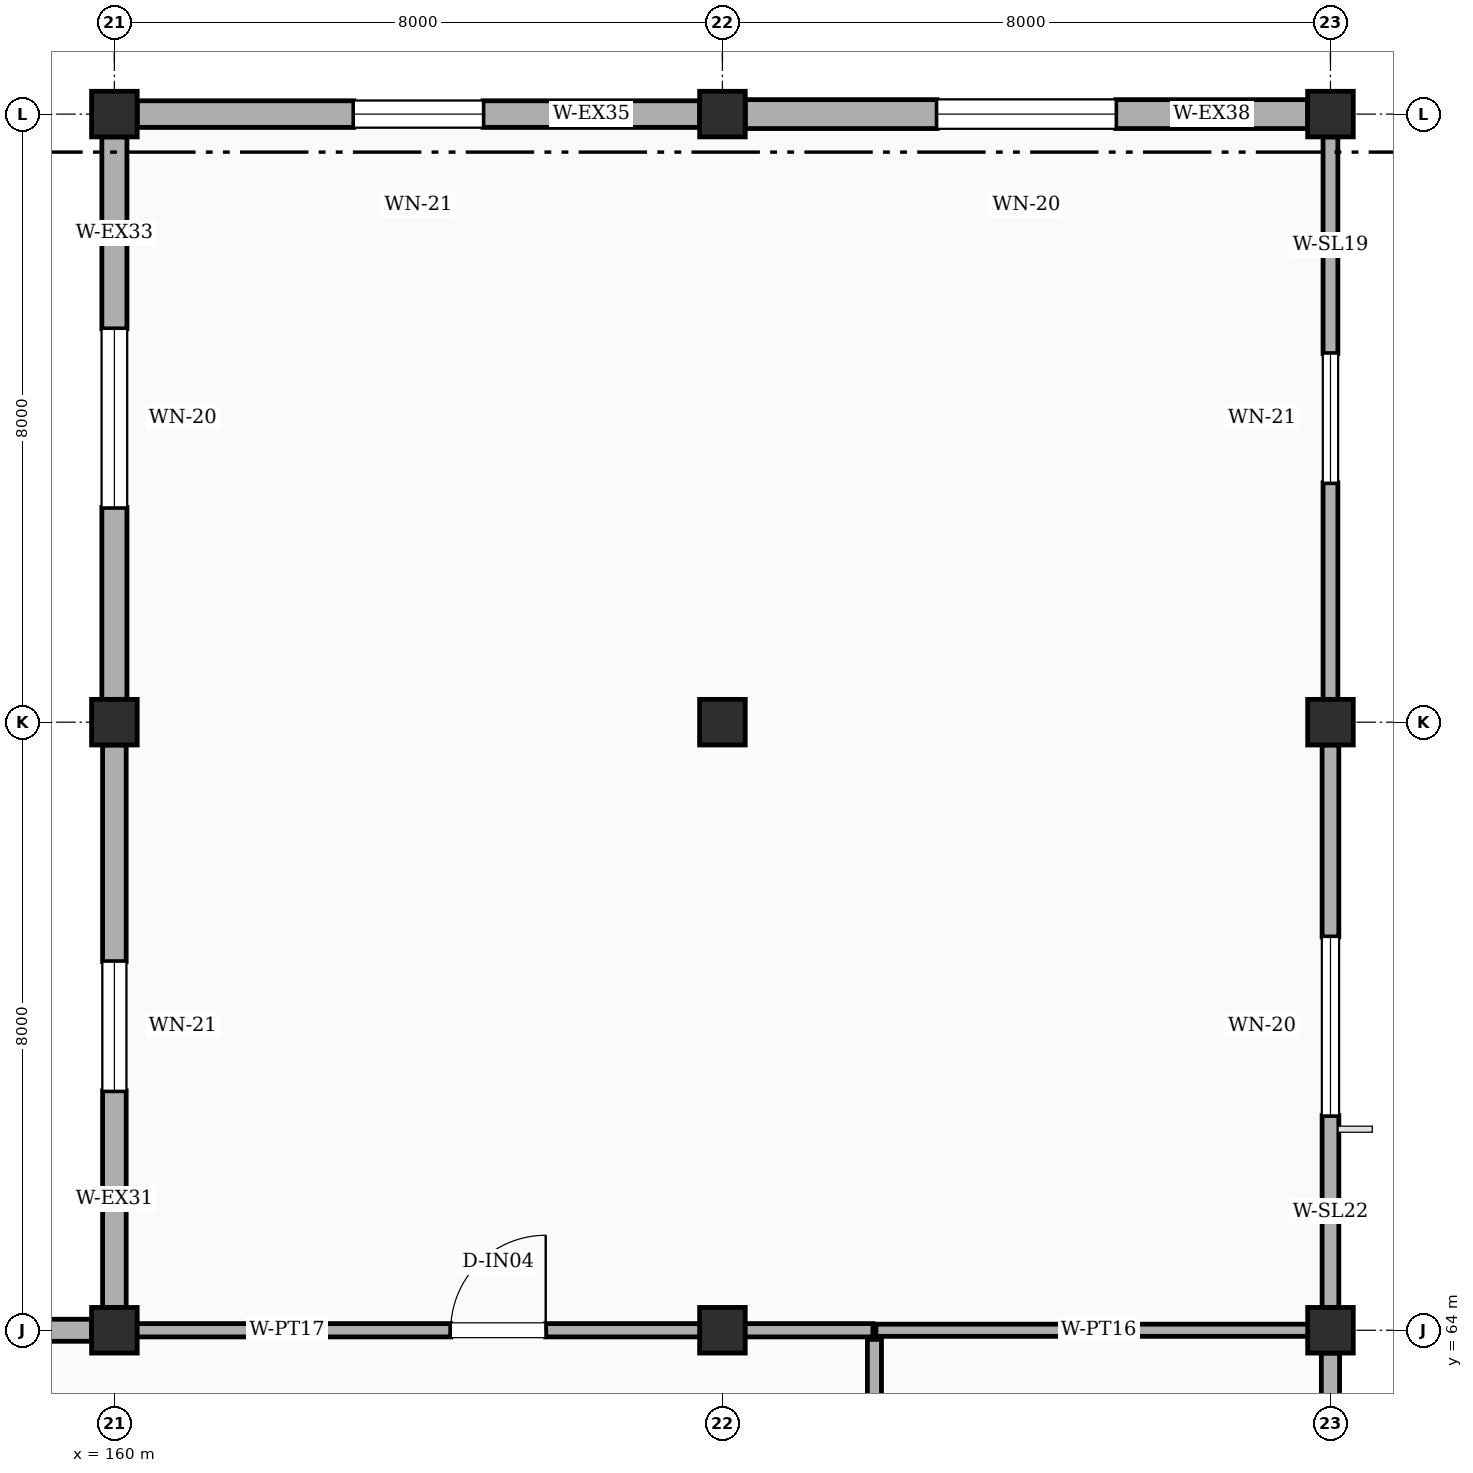
"""IFC4 building model, lengths in metres.
Left out: names, types, materials, properties, quantities, classifications, styles, units other than length and angle.
Written with IfcOpenShell. Run it as: python <this file> out.ifc"""

import sys

from ifc_helpers import new_model, si_unit, direction, frame, frame_2d, origin, origin_2d, place, context, subcontext, project, spatial, rectangle, extrude, element, fill, save


model = new_model("IFC4")
c1 = context("Model", 3, precision=1e-05, world=origin(), true_north=direction((0.0, 1.0)))
c2 = subcontext(c1, "Body", "Model", "MODEL_VIEW")
j1 = project(units=[si_unit("LENGTHUNIT", "METRE"), si_unit("PLANEANGLEUNIT", "RADIAN")], contexts=[c1])
p1 = place(None, origin())
s1 = spatial("IfcSite", under=j1, at=p1, CompositionType="ELEMENT")
p2 = place(p1, origin())
s2 = spatial("IfcBuilding", under=s1, at=p2, CompositionType="ELEMENT")
p3 = place(p2, frame((0.0, 0.0, 19.2)))
s3 = spatial("IfcBuildingStorey", under=s2, at=p3, CompositionType="ELEMENT", Elevation=19.2)
for number, where, z_axis, x_axis in (
    (1, (160.0, 64.0, 0.0), (0.0, 0.0, 1.0), (1.0, 0.0, 0.0)),
    (2, (168.0, 64.0, 0.0), (0.0, 0.0, 1.0), (1.0, 0.0, 0.0)),
    (3, (176.0, 64.0, 0.0), (0.0, 0.0, 1.0), (1.0, 0.0, 0.0)),
    (4, (160.0, 72.0, 0.0), (0.0, 0.0, 1.0), (1.0, 0.0, 0.0)),
    (5, (160.0, 80.0, 0.0), (0.0, 0.0, 1.0), (1.0, 0.0, 0.0)),
    (6, (168.0, 72.0, 0.0), (0.0, 0.0, 1.0), (1.0, 0.0, 0.0)),
    (7, (168.0, 80.0, 0.0), (0.0, 0.0, 1.0), (1.0, 0.0, 0.0)),
    (8, (176.0, 72.0, 0.0), (0.0, 0.0, 1.0), (1.0, 0.0, 0.0)),
    (9, (176.0, 80.0, 0.0), (0.0, 0.0, 1.0), (1.0, 0.0, 0.0)),
):
    element("IfcColumn", number, at=place(p3, frame(where, z_axis=z_axis, x_axis=x_axis)), inside=s3, PredefinedType="COLUMN", context=c2, shape_type="SweptSolid", body=[
        extrude(rectangle(XDim=0.6, YDim=0.6, at=origin_2d()), origin(), (0.0, 0.0, 1.0), 4.2),
    ])
p4 = place(p3, frame((176.0, 56.3, 0.0), z_axis=(0.0, 0.0, 1.0), x_axis=(0.0, 1.0, 0.0)))
e10 = element("IfcWall", 10, at=p4, inside=s3, PredefinedType="SOLIDWALL", context=c2, shape_type="SweptSolid", body=[
    extrude(rectangle(XDim=7.4, YDim=0.24, at=frame_2d((3.7, 0.0))), origin(), (0.0, 0.0, 1.0), 3.57),
])
p5 = place(p4, frame((2.85, 0.0, 0.95)))
e11 = element("IfcOpeningElement", 11, at=p5, cuts=e10, PredefinedType="OPENING", context=c2, shape_type="SweptSolid", body=[
    extrude(rectangle(XDim=1.7, YDim=1.65, at=frame_2d((0.85, 0.825))), frame((0.0, 0.13, 0.0), z_axis=(0.0, -1.0, 0.0), x_axis=(1.0, 0.0, 0.0)), (0.0, 0.0, 1.0), 0.26),
])
p6 = place(p3, frame((176.0, 64.3, 0.0), z_axis=(0.0, 0.0, 1.0), x_axis=(0.0, 1.0, 0.0)))
e12 = element("IfcWall", 12, at=p6, inside=s3, PredefinedType="SOLIDWALL", context=c2, shape_type="SweptSolid", body=[
    extrude(rectangle(XDim=7.4, YDim=0.22, at=frame_2d((3.7, 0.0))), origin(), (0.0, 0.0, 1.0), 3.57),
])
p7 = place(p6, frame((2.525, 0.0, 0.95)))
e13 = element("IfcOpeningElement", 13, at=p7, cuts=e12, PredefinedType="OPENING", context=c2, shape_type="SweptSolid", body=[
    extrude(rectangle(XDim=2.35, YDim=1.65, at=frame_2d((1.175, 0.825))), frame((0.0, 0.12, 0.0), z_axis=(0.0, -1.0, 0.0), x_axis=(1.0, 0.0, 0.0)), (0.0, 0.0, 1.0), 0.24),
])
p8 = place(p3, frame((176.0, 72.3, 0.0), z_axis=(0.0, 0.0, 1.0), x_axis=(0.0, 1.0, 0.0)))
e14 = element("IfcWall", 14, at=p8, inside=s3, PredefinedType="SOLIDWALL", context=c2, shape_type="SweptSolid", body=[
    extrude(rectangle(XDim=7.4, YDim=0.195, at=frame_2d((3.7, 0.0))), origin(), (0.0, 0.0, 1.0), 3.58),
])
p9 = place(p8, frame((2.85, 0.0, 0.95)))
e15 = element("IfcOpeningElement", 15, at=p9, cuts=e14, PredefinedType="OPENING", context=c2, shape_type="SweptSolid", body=[
    extrude(rectangle(XDim=1.7, YDim=1.65, at=frame_2d((0.85, 0.825))), frame((0.0, 0.107, 0.0), z_axis=(0.0, -1.0, 0.0), x_axis=(1.0, 0.0, 0.0)), (0.0, 0.0, 1.0), 0.215),
])
p10 = place(p3, frame((175.7, 80.0, 0.0), z_axis=(0.0, 0.0, 1.0), x_axis=(-1.0, 0.0, 0.0)))
e16 = element("IfcWall", 16, at=p10, inside=s3, PredefinedType="STANDARD", context=c2, shape_type="SweptSolid", body=[
    extrude(rectangle(XDim=7.4, YDim=0.38, at=frame_2d((3.7, 0.0))), origin(), (0.0, 0.0, 1.0), 3.58),
])
p11 = place(p10, frame((2.525, 0.0, 0.95)))
e17 = element("IfcOpeningElement", 17, at=p11, cuts=e16, PredefinedType="OPENING", context=c2, shape_type="SweptSolid", body=[
    extrude(rectangle(XDim=2.35, YDim=1.65, at=frame_2d((1.175, 0.825))), frame((0.0, 0.2, 0.0), z_axis=(0.0, -1.0, 0.0), x_axis=(1.0, 0.0, 0.0)), (0.0, 0.0, 1.0), 0.4),
])
p12 = place(p3, frame((167.7, 80.0, 0.0), z_axis=(0.0, 0.0, 1.0), x_axis=(-1.0, 0.0, 0.0)))
e18 = element("IfcWall", 18, at=p12, inside=s3, PredefinedType="STANDARD", context=c2, shape_type="SweptSolid", body=[
    extrude(rectangle(XDim=7.4, YDim=0.35, at=frame_2d((3.7, 0.0))), origin(), (0.0, 0.0, 1.0), 3.58),
])
p13 = place(p12, frame((2.85, 0.0, 0.95)))
e19 = element("IfcOpeningElement", 19, at=p13, cuts=e18, PredefinedType="OPENING", context=c2, shape_type="SweptSolid", body=[
    extrude(rectangle(XDim=1.7, YDim=1.65, at=frame_2d((0.85, 0.825))), frame((0.0, 0.185, 0.0), z_axis=(0.0, -1.0, 0.0), x_axis=(1.0, 0.0, 0.0)), (0.0, 0.0, 1.0), 0.37),
])
p14 = place(p3, frame((160.0, 79.7, 0.0), z_axis=(0.0, 0.0, 1.0), x_axis=(0.0, -1.0, 0.0)))
e20 = element("IfcWall", 20, at=p14, inside=s3, PredefinedType="STANDARD", context=c2, shape_type="SweptSolid", body=[
    extrude(rectangle(XDim=7.4, YDim=0.33, at=frame_2d((3.7, 0.0))), origin(), (0.0, 0.0, 1.0), 3.58),
])
p15 = place(p14, frame((2.525, 0.0, 0.95)))
e21 = element("IfcOpeningElement", 21, at=p15, cuts=e20, PredefinedType="OPENING", context=c2, shape_type="SweptSolid", body=[
    extrude(rectangle(XDim=2.35, YDim=1.65, at=frame_2d((1.175, 0.825))), frame((0.0, 0.175, 0.0), z_axis=(0.0, -1.0, 0.0), x_axis=(1.0, 0.0, 0.0)), (0.0, 0.0, 1.0), 0.35),
])
p16 = place(p3, frame((160.0, 71.7, 0.0), z_axis=(0.0, 0.0, 1.0), x_axis=(0.0, -1.0, 0.0)))
e22 = element("IfcWall", 22, at=p16, inside=s3, PredefinedType="STANDARD", context=c2, shape_type="SweptSolid", body=[
    extrude(rectangle(XDim=7.4, YDim=0.31, at=frame_2d((3.7, 0.0))), origin(), (0.0, 0.0, 1.0), 3.57),
])
p17 = place(p16, frame((2.85, 0.0, 0.95)))
e23 = element("IfcOpeningElement", 23, at=p17, cuts=e22, PredefinedType="OPENING", context=c2, shape_type="SweptSolid", body=[
    extrude(rectangle(XDim=1.7, YDim=1.65, at=frame_2d((0.85, 0.825))), frame((0.0, 0.165, 0.0), z_axis=(0.0, -1.0, 0.0), x_axis=(1.0, 0.0, 0.0)), (0.0, 0.0, 1.0), 0.33),
])
p18 = place(p3, frame((159.7, 64.0, 0.0), z_axis=(0.0, 0.0, 1.0), x_axis=(-1.0, 0.0, 0.0)))
e24 = element("IfcWall", 24, at=p18, inside=s3, PredefinedType="STANDARD", context=c2, shape_type="SweptSolid", body=[
    extrude(rectangle(XDim=7.4, YDim=0.29, at=frame_2d((3.7, 0.0))), origin(), (0.0, 0.0, 1.0), 3.57),
])
p19 = place(p18, frame((2.525, 0.0, 0.95)))
e25 = element("IfcOpeningElement", 25, at=p19, cuts=e24, PredefinedType="OPENING", context=c2, shape_type="SweptSolid", body=[
    extrude(rectangle(XDim=2.35, YDim=1.65, at=frame_2d((1.175, 0.825))), frame((0.0, 0.155, 0.0), z_axis=(0.0, -1.0, 0.0), x_axis=(1.0, 0.0, 0.0)), (0.0, 0.0, 1.0), 0.31),
])
p20 = place(p3, frame((170.0, 59.02, 0.0), z_axis=(0.0, 0.0, 1.0), x_axis=(0.0, 1.0, 0.0)))
e26 = element("IfcWall", 26, at=p20, inside=s3, PredefinedType="PLUMBINGWALL", context=c2, shape_type="SweptSolid", body=[
    extrude(rectangle(XDim=4.86, YDim=0.185, at=frame_2d((2.43, 0.0))), origin(), (0.0, 0.0, 1.0), 3.37),
])
p21 = place(p20, frame((1.95, 0.0, 0.0)))
e27 = element("IfcOpeningElement", 27, at=p21, cuts=e26, PredefinedType="OPENING", context=c2, shape_type="SweptSolid", body=[
    extrude(rectangle(XDim=0.96, YDim=2.1, at=frame_2d((0.48, 1.05))), frame((0.0, 0.103, 0.0), z_axis=(0.0, -1.0, 0.0), x_axis=(1.0, 0.0, 0.0)), (0.0, 0.0, 1.0), 0.205),
])
p22 = place(p3, frame((160.12, 64.0, 0.0), z_axis=(0.0, 0.0, 1.0), x_axis=(1.0, 0.0, 0.0)))
e28 = element("IfcWall", 28, at=p22, inside=s3, PredefinedType="PARTITIONING", context=c2, shape_type="SweptSolid", body=[
    extrude(rectangle(XDim=9.86, YDim=0.175, at=frame_2d((4.93, 0.0))), origin(), (0.0, 0.0, 1.0), 3.37),
])
p23 = place(p22, frame((4.305, 0.0, 0.0)))
e29 = element("IfcOpeningElement", 29, at=p23, cuts=e28, PredefinedType="OPENING", context=c2, shape_type="SweptSolid", body=[
    extrude(rectangle(XDim=1.25, YDim=2.15, at=frame_2d((0.625, 1.075))), frame((0.0, 0.097, 0.0), z_axis=(0.0, -1.0, 0.0), x_axis=(1.0, 0.0, 0.0)), (0.0, 0.0, 1.0), 0.195),
])
p24 = place(p3, frame((170.02, 64.0, 0.0), z_axis=(0.0, 0.0, 1.0), x_axis=(1.0, 0.0, 0.0)))
e30 = element("IfcWall", 30, at=p24, inside=s3, PredefinedType="PARTITIONING", context=c2, shape_type="SweptSolid", body=[
    extrude(rectangle(XDim=5.86, YDim=0.16, at=frame_2d((2.93, 0.0))), origin(), (0.0, 0.0, 1.0), 3.37),
])
p25 = place(p7, origin())
e31 = element("IfcWindow", 31, at=p25, inside=s3, PartitioningType="SINGLE_PANEL", PredefinedType="WINDOW", context=c2, shape_type="SweptSolid", body=[
    extrude(rectangle(XDim=2.35, YDim=1.65, at=frame_2d((1.175, 0.825))), frame((0.0, 0.03, 0.0), z_axis=(0.0, -1.0, 0.0), x_axis=(1.0, 0.0, 0.0)), (0.0, 0.0, 1.0), 0.06),
])
fill(e13, e31)
p26 = place(p9, origin())
e32 = element("IfcWindow", 32, at=p26, inside=s3, PartitioningType="SINGLE_PANEL", PredefinedType="WINDOW", context=c2, shape_type="SweptSolid", body=[
    extrude(rectangle(XDim=1.7, YDim=1.65, at=frame_2d((0.85, 0.825))), frame((0.0, 0.03, 0.0), z_axis=(0.0, -1.0, 0.0), x_axis=(1.0, 0.0, 0.0)), (0.0, 0.0, 1.0), 0.06),
])
fill(e15, e32)
p27 = place(p11, origin())
e33 = element("IfcWindow", 33, at=p27, inside=s3, PartitioningType="SINGLE_PANEL", PredefinedType="WINDOW", context=c2, shape_type="SweptSolid", body=[
    extrude(rectangle(XDim=2.35, YDim=1.65, at=frame_2d((1.175, 0.825))), frame((0.0, 0.03, 0.0), z_axis=(0.0, -1.0, 0.0), x_axis=(1.0, 0.0, 0.0)), (0.0, 0.0, 1.0), 0.06),
])
fill(e17, e33)
p28 = place(p13, origin())
e34 = element("IfcWindow", 34, at=p28, inside=s3, PartitioningType="SINGLE_PANEL", PredefinedType="WINDOW", context=c2, shape_type="SweptSolid", body=[
    extrude(rectangle(XDim=1.7, YDim=1.65, at=frame_2d((0.85, 0.825))), frame((0.0, 0.03, 0.0), z_axis=(0.0, -1.0, 0.0), x_axis=(1.0, 0.0, 0.0)), (0.0, 0.0, 1.0), 0.06),
])
fill(e19, e34)
p29 = place(p15, origin())
e35 = element("IfcWindow", 35, at=p29, inside=s3, PartitioningType="SINGLE_PANEL", PredefinedType="WINDOW", context=c2, shape_type="SweptSolid", body=[
    extrude(rectangle(XDim=2.35, YDim=1.65, at=frame_2d((1.175, 0.825))), frame((0.0, 0.03, 0.0), z_axis=(0.0, -1.0, 0.0), x_axis=(1.0, 0.0, 0.0)), (0.0, 0.0, 1.0), 0.06),
])
fill(e21, e35)
p30 = place(p17, origin())
e36 = element("IfcWindow", 36, at=p30, inside=s3, PartitioningType="SINGLE_PANEL", PredefinedType="WINDOW", context=c2, shape_type="SweptSolid", body=[
    extrude(rectangle(XDim=1.7, YDim=1.65, at=frame_2d((0.85, 0.825))), frame((0.0, 0.03, 0.0), z_axis=(0.0, -1.0, 0.0), x_axis=(1.0, 0.0, 0.0)), (0.0, 0.0, 1.0), 0.06),
])
fill(e23, e36)
p31 = place(p23, origin())
e37 = element("IfcDoor", 37, at=p31, inside=s3, OperationType="SINGLE_SWING_RIGHT", PredefinedType="DOOR", context=c2, shape_type="SweptSolid", body=[
    extrude(rectangle(XDim=1.25, YDim=2.15, at=frame_2d((0.625, 1.075))), frame((0.0, 0.025, 0.0), z_axis=(0.0, -1.0, 0.0), x_axis=(1.0, 0.0, 0.0)), (0.0, 0.0, 1.0), 0.05),
])
fill(e29, e37)
save(model, sys.argv[1])
